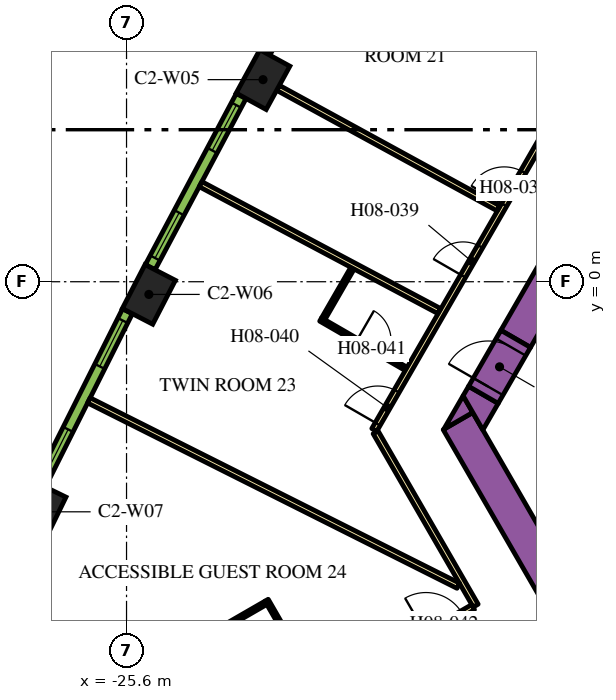
"""IFC4 building model, lengths in metres.
Left out: names, types, materials, properties, quantities, classifications, styles, units other than length and angle.
Written with IfcOpenShell. Run it as: python <this file> out.ifc"""

import sys

from ifc_helpers import new_model, si_unit, direction, frame, frame_2d, origin, origin_2d, place, context, subcontext, project, spatial, polyline, rectangle, outline, extrude, element, fill, save


model = new_model("IFC4")
c1 = context("Model", 3, precision=1e-05, world=origin(), true_north=direction((0.0, 1.0)))
c2 = subcontext(c1, "Body", "Model", "MODEL_VIEW")
j1 = project(units=[si_unit("LENGTHUNIT", "METRE"), si_unit("PLANEANGLEUNIT", "RADIAN")], contexts=[c1])
p1 = place(None, origin())
s1 = spatial("IfcSite", under=j1, at=p1, CompositionType="ELEMENT")
p2 = place(p1, origin())
s2 = spatial("IfcBuilding", under=s1, at=p2, CompositionType="ELEMENT")
p3 = place(p2, frame((0.0, 0.0, 107.1)))
s3 = spatial("IfcBuildingStorey", under=s2, at=p3, CompositionType="ELEMENT", Elevation=107.1)
for number, where, z_axis, x_axis in (
    (1, (-22.009, 5.317, 0.0), (0.0, 0.0, 1.0), (-0.48, -0.877, 0.0)),
    (2, (-25.012, -0.334, 0.0), (0.0, 0.0, 1.0), (-0.459, -0.888, 0.0)),
    (3, (-27.883, -6.054, 0.0), (0.0, 0.0, 1.0), (-0.438, -0.899, 0.0)),
):
    element("IfcColumn", number, at=place(p3, frame(where, z_axis=z_axis, x_axis=x_axis)), inside=s3, PredefinedType="COLUMN", context=c2, shape_type="SweptSolid", body=[
        extrude(rectangle(XDim=1.3, YDim=0.9, at=origin_2d()), origin(), (0.0, 0.0, 1.0), 3.9),
    ])
p4 = place(p3, frame((-15.36, -1.503, 0.0), z_axis=(0.0, 0.0, 1.0), x_axis=(0.50000389221, 0.866023156604, 0.0)))
e4 = element("IfcWall", 4, at=p4, inside=s3, PredefinedType="SOLIDWALL", context=c2, shape_type="SweptSolid", body=[
    extrude(rectangle(XDim=21.0, YDim=0.9, at=frame_2d((10.5, 0.0))), origin(), (0.0, 0.0, 1.0), 3.9),
])
p5 = place(p3, frame((-12.134, -11.883, 0.0), z_axis=(0.0, 0.0, 1.0), x_axis=(-0.500005339912, 0.866022320763, 0.0)))
e5 = element("IfcWall", 5, at=p5, inside=s3, PredefinedType="SOLIDWALL", context=c2, shape_type="SweptSolid", body=[
    extrude(rectangle(XDim=9.488, YDim=0.9, at=frame_2d((4.744, 0.0))), origin(), (0.0, 0.0, 1.0), 3.9),
])
p6 = place(p3, origin())
e6 = element("IfcWall", 6, at=p6, inside=s3, PredefinedType="SOLIDWALL", context=c2, shape_type="SweptSolid", body=[
    extrude(outline(polyline([(-16.489, -3.44), (-17.251, -3.88), (-16.743, -3.0), (-16.489, -3.44)])), origin(), (0.0, 0.0, 1.0), 3.9),
])
e7 = element("IfcWall", 7, at=p6, inside=s3, PredefinedType="SOLIDWALL", context=c2, shape_type="SweptSolid", body=[
    extrude(outline(polyline([(-15.82, -3.201), (-16.223, -3.9), (-16.743, -3.0), (-16.599, -2.751), (-15.82, -3.201)])), origin(), (0.0, 0.0, 1.0), 3.9),
])
p7 = place(p3, frame((-16.209, -2.976, 0.0), z_axis=(0.0, 0.0, 1.0), x_axis=(0.499954529098, 0.86605165483, 0.0)))
e8 = element("IfcWall", 8, at=p7, inside=s3, PredefinedType="SOLIDWALL", context=c2, shape_type="SweptSolid", body=[
    extrude(rectangle(XDim=1.7, YDim=0.9, at=frame_2d((0.85, 0.0))), origin(), (0.0, 0.0, 1.0), 3.9),
])
p8 = place(p7, frame((0.25, 0.0, 0.0)))
e9 = element("IfcOpeningElement", 9, at=p8, cuts=e8, PredefinedType="OPENING", context=c2, shape_type="SweptSolid", body=[
    extrude(rectangle(XDim=1.2, YDim=2.1, at=frame_2d((0.6, 1.05))), frame((0.0, 0.46, 0.0), z_axis=(0.0, -1.0, 0.0), x_axis=(1.0, 0.0, 0.0)), (0.0, 0.0, 1.0), 0.92),
])
p9 = place(p3, frame((-19.081, -3.9, 0.0), z_axis=(0.0, 0.0, 1.0), x_axis=(0.499998313975, 0.866026377209, 0.0)))
e10 = element("IfcWall", 10, at=p9, inside=s3, PredefinedType="PARTITIONING", context=c2, shape_type="SweptSolid", body=[
    extrude(rectangle(XDim=25.766, YDim=0.15, at=frame_2d((12.883, 0.0))), origin(), (0.0, 0.0, 1.0), 2.75),
])
p10 = place(p9, frame((19.306, 0.0, 0.0)))
e11 = element("IfcOpeningElement", 11, at=p10, cuts=e10, PredefinedType="OPENING", context=c2, shape_type="SweptSolid", body=[
    extrude(rectangle(XDim=1.0, YDim=2.1, at=frame_2d((0.5, 1.05))), frame((0.0, 0.085, 0.0), z_axis=(0.0, -1.0, 0.0), x_axis=(1.0, 0.0, 0.0)), (0.0, 0.0, 1.0), 0.17),
])
p11 = place(p9, frame((18.0, 0.0, 0.0)))
e12 = element("IfcOpeningElement", 12, at=p11, cuts=e10, PredefinedType="OPENING", context=c2, shape_type="SweptSolid", body=[
    extrude(rectangle(XDim=1.0, YDim=2.1, at=frame_2d((0.5, 1.05))), frame((0.0, 0.085, 0.0), z_axis=(0.0, -1.0, 0.0), x_axis=(1.0, 0.0, 0.0)), (0.0, 0.0, 1.0), 0.17),
])
p12 = place(p9, frame((6.838, 0.0, 0.0)))
e13 = element("IfcOpeningElement", 13, at=p12, cuts=e10, PredefinedType="OPENING", context=c2, shape_type="SweptSolid", body=[
    extrude(rectangle(XDim=1.0, YDim=2.1, at=frame_2d((0.5, 1.05))), frame((0.0, 0.085, 0.0), z_axis=(0.0, -1.0, 0.0), x_axis=(1.0, 0.0, 0.0)), (0.0, 0.0, 1.0), 0.17),
])
p13 = place(p9, frame((4.674, 0.0, 0.0)))
e14 = element("IfcOpeningElement", 14, at=p13, cuts=e10, PredefinedType="OPENING", context=c2, shape_type="SweptSolid", body=[
    extrude(rectangle(XDim=0.9, YDim=2.1, at=frame_2d((0.45, 1.05))), frame((0.0, 0.085, 0.0), z_axis=(0.0, -1.0, 0.0), x_axis=(1.0, 0.0, 0.0)), (0.0, 0.0, 1.0), 0.17),
])
p14 = place(p9, frame((0.18, 0.0, 0.0)))
e15 = element("IfcOpeningElement", 15, at=p14, cuts=e10, PredefinedType="OPENING", context=c2, shape_type="SweptSolid", body=[
    extrude(rectangle(XDim=1.0, YDim=2.1, at=frame_2d((0.5, 1.05))), frame((0.0, 0.085, 0.0), z_axis=(0.0, -1.0, 0.0), x_axis=(1.0, 0.0, 0.0)), (0.0, 0.0, 1.0), 0.17),
])
p15 = place(p3, frame((-16.412, -8.523, 0.0), z_axis=(0.0, 0.0, 1.0), x_axis=(-0.500001929737, 0.866024289647, 0.0)))
e16 = element("IfcWall", 16, at=p15, inside=s3, PredefinedType="PARTITIONING", context=c2, shape_type="SweptSolid", body=[
    extrude(rectangle(XDim=5.268, YDim=0.15, at=frame_2d((2.634, 0.0))), origin(), (0.0, 0.0, 1.0), 2.75),
])
p16 = place(p3, frame((-28.211, -15.335, 0.0), z_axis=(0.0, 0.0, 1.0), x_axis=(0.866025884867, 0.49999916674, 0.0)))
e17 = element("IfcWall", 17, at=p16, inside=s3, PredefinedType="PARTITIONING", context=c2, shape_type="SweptSolid", body=[
    extrude(rectangle(XDim=13.543, YDim=0.15, at=frame_2d((6.772, 0.0))), origin(), (0.0, 0.0, 1.0), 2.75),
])
p17 = place(p16, frame((12.114, 0.0, 0.0)))
e18 = element("IfcOpeningElement", 18, at=p17, cuts=e17, PredefinedType="OPENING", context=c2, shape_type="SweptSolid", body=[
    extrude(rectangle(XDim=1.1, YDim=2.1, at=frame_2d((0.55, 1.05))), frame((0.0, 0.085, 0.0), z_axis=(0.0, -1.0, 0.0), x_axis=(1.0, 0.0, 0.0)), (0.0, 0.0, 1.0), 0.17),
])
p18 = place(p16, frame((4.65, 0.0, 0.0)))
e19 = element("IfcOpeningElement", 19, at=p18, cuts=e17, PredefinedType="OPENING", context=c2, shape_type="SweptSolid", body=[
    extrude(rectangle(XDim=1.0, YDim=2.1, at=frame_2d((0.5, 1.05))), frame((0.0, 0.085, 0.0), z_axis=(0.0, -1.0, 0.0), x_axis=(1.0, 0.0, 0.0)), (0.0, 0.0, 1.0), 0.17),
])
p19 = place(p3, frame((-29.406, -8.901, 0.0), z_axis=(0.0, 0.0, 1.0), x_axis=(0.904002363742, -0.427527456836, 0.0)))
e20 = element("IfcWall", 20, at=p19, inside=s3, PredefinedType="PARTITIONING", context=c2, shape_type="SweptSolid", body=[
    extrude(rectangle(XDim=7.362, YDim=0.15, at=frame_2d((3.681, 0.0))), origin(), (0.0, 0.0, 1.0), 2.75),
])
p20 = place(p3, frame((-23.652, 2.567, 0.0), z_axis=(0.0, 0.0, 1.0), x_axis=(0.883019237957, -0.469336793144, 0.0)))
e21 = element("IfcWall", 21, at=p20, inside=s3, PredefinedType="PARTITIONING", context=c2, shape_type="SweptSolid", body=[
    extrude(rectangle(XDim=7.111, YDim=0.15, at=frame_2d((3.555, 0.0))), origin(), (0.0, 0.0, 1.0), 2.75),
])
p21 = place(p3, frame((-26.591, -3.122, 0.0), z_axis=(0.0, 0.0, 1.0), x_axis=(0.893766213273, -0.448533115847, 0.0)))
e22 = element("IfcWall", 22, at=p21, inside=s3, PredefinedType="PARTITIONING", context=c2, shape_type="SweptSolid", body=[
    extrude(rectangle(XDim=10.875, YDim=0.15, at=frame_2d((5.438, 0.0))), origin(), (0.0, 0.0, 1.0), 2.75),
])
p22 = place(p3, frame((-21.614, 5.102, 0.0), z_axis=(0.0, 0.0, 1.0), x_axis=(0.877484555087, -0.479604895287, 0.0)))
e23 = element("IfcWall", 23, at=p22, inside=s3, PredefinedType="PARTITIONING", context=c2, shape_type="SweptSolid", body=[
    extrude(rectangle(XDim=6.611, YDim=0.15, at=frame_2d((3.306, 0.0))), origin(), (0.0, 0.0, 1.0), 2.75),
])
p23 = place(p3, frame((-15.852, 7.044, 0.0), z_axis=(0.0, 0.0, 1.0), x_axis=(0.866021400173, -0.500006934395, 0.0)))
e24 = element("IfcWall", 24, at=p23, inside=s3, PredefinedType="PARTITIONING", context=c2, shape_type="SweptSolid", body=[
    extrude(rectangle(XDim=2.6, YDim=0.1, at=frame_2d((1.3, 0.0))), origin(), (0.0, 0.0, 1.0), 2.75),
])
p24 = place(p23, frame((1.1, 0.0, 0.0)))
e25 = element("IfcOpeningElement", 25, at=p24, cuts=e24, PredefinedType="OPENING", context=c2, shape_type="SweptSolid", body=[
    extrude(rectangle(XDim=0.9, YDim=2.1, at=frame_2d((0.45, 1.05))), frame((0.0, 0.06, 0.0), z_axis=(0.0, -1.0, 0.0), x_axis=(1.0, 0.0, 0.0)), (0.0, 0.0, 1.0), 0.12),
])
p25 = place(p3, frame((-20.492, -0.994, 0.0), z_axis=(0.0, 0.0, 1.0), x_axis=(0.865997922154, -0.500047596559, 0.0)))
e26 = element("IfcWall", 26, at=p25, inside=s3, PredefinedType="PARTITIONING", context=c2, shape_type="SweptSolid", body=[
    extrude(rectangle(XDim=2.6, YDim=0.1, at=frame_2d((1.3, 0.0))), origin(), (0.0, 0.0, 1.0), 2.75),
])
p26 = place(p25, frame((1.1, 0.0, 0.0)))
e27 = element("IfcOpeningElement", 27, at=p26, cuts=e26, PredefinedType="OPENING", context=c2, shape_type="SweptSolid", body=[
    extrude(rectangle(XDim=0.9, YDim=2.1, at=frame_2d((0.45, 1.05))), frame((0.0, 0.06, 0.0), z_axis=(0.0, -1.0, 0.0), x_axis=(1.0, 0.0, 0.0)), (0.0, 0.0, 1.0), 0.12),
])
p27 = place(p3, frame((-20.424, -0.976, 0.0), z_axis=(0.0, 0.0, 1.0), x_axis=(0.500086174919, 0.865975644955, 0.0)))
e28 = element("IfcWall", 28, at=p27, inside=s3, PredefinedType="PARTITIONING", context=c2, shape_type="SweptSolid", body=[
    extrude(rectangle(XDim=1.53, YDim=0.1, at=frame_2d((0.765, 0.0))), origin(), (0.0, 0.0, 1.0), 2.75),
])
p28 = place(p3, frame((-20.515, -10.805, 0.0), z_axis=(0.0, 0.0, 1.0), x_axis=(-0.49994636267, 0.866056369097, 0.0)))
e29 = element("IfcWall", 29, at=p28, inside=s3, PredefinedType="PARTITIONING", context=c2, shape_type="SweptSolid", body=[
    extrude(rectangle(XDim=2.8, YDim=0.1, at=frame_2d((1.4, 0.0))), origin(), (0.0, 0.0, 1.0), 2.75),
])
p29 = place(p28, frame((0.55, 0.0, 0.0)))
e30 = element("IfcOpeningElement", 30, at=p29, cuts=e29, PredefinedType="OPENING", context=c2, shape_type="SweptSolid", body=[
    extrude(rectangle(XDim=1.0, YDim=2.1, at=frame_2d((0.5, 1.05))), frame((0.0, 0.06, 0.0), z_axis=(0.0, -1.0, 0.0), x_axis=(1.0, 0.0, 0.0)), (0.0, 0.0, 1.0), 0.12),
])
p30 = place(p3, frame((-21.933, -8.448, 0.0), z_axis=(0.0, 0.0, 1.0), x_axis=(-0.866022959057, -0.500004234368, 0.0)))
e31 = element("IfcWall", 31, at=p30, inside=s3, PredefinedType="PARTITIONING", context=c2, shape_type="SweptSolid", body=[
    extrude(rectangle(XDim=2.5, YDim=0.1, at=frame_2d((1.25, 0.0))), origin(), (0.0, 0.0, 1.0), 2.75),
])
p31 = place(p3, frame((-19.458, 10.48, 0.0), z_axis=(0.0, 0.0, 1.0), x_axis=(-0.48983164787, -0.87181704316, 0.0)))
e32 = element("IfcWall", 32, at=p31, inside=s3, PredefinedType="SOLIDWALL", context=c2, shape_type="SweptSolid", body=[
    extrude(rectangle(XDim=5.1, YDim=0.29, at=frame_2d((2.55, 0.0))), origin(), (0.0, 0.0, 1.0), 3.65),
])
p32 = place(p31, frame((0.272, 0.0, 0.9)))
e33 = element("IfcOpeningElement", 33, at=p32, cuts=e32, PredefinedType="OPENING", context=c2, shape_type="SweptSolid", body=[
    extrude(rectangle(XDim=1.35, YDim=2.15, at=frame_2d((0.675, 1.075))), frame((0.0, 0.155, 0.0), z_axis=(0.0, -1.0, 0.0), x_axis=(1.0, 0.0, 0.0)), (0.0, 0.0, 1.0), 0.31),
])
p33 = place(p31, frame((3.478, 0.0, 0.9)))
e34 = element("IfcOpeningElement", 34, at=p33, cuts=e32, PredefinedType="OPENING", context=c2, shape_type="SweptSolid", body=[
    extrude(rectangle(XDim=1.35, YDim=2.15, at=frame_2d((0.675, 1.075))), frame((0.0, 0.155, 0.0), z_axis=(0.0, -1.0, 0.0), x_axis=(1.0, 0.0, 0.0)), (0.0, 0.0, 1.0), 0.31),
])
p34 = place(p3, frame((-22.583, 4.887, 0.0), z_axis=(0.0, 0.0, 1.0), x_axis=(-0.469323203119, -0.883026461106, 0.0)))
e35 = element("IfcWall", 35, at=p34, inside=s3, PredefinedType="SOLIDWALL", context=c2, shape_type="SweptSolid", body=[
    extrude(rectangle(XDim=5.101, YDim=0.29, at=frame_2d((2.55, 0.0))), origin(), (0.0, 0.0, 1.0), 3.65),
])
p35 = place(p34, frame((0.273, 0.0, 0.9)))
e36 = element("IfcOpeningElement", 36, at=p35, cuts=e35, PredefinedType="OPENING", context=c2, shape_type="SweptSolid", body=[
    extrude(rectangle(XDim=1.35, YDim=2.15, at=frame_2d((0.675, 1.075))), frame((0.0, 0.155, 0.0), z_axis=(0.0, -1.0, 0.0), x_axis=(1.0, 0.0, 0.0)), (0.0, 0.0, 1.0), 0.31),
])
p36 = place(p34, frame((3.478, 0.0, 0.9)))
e37 = element("IfcOpeningElement", 37, at=p36, cuts=e35, PredefinedType="OPENING", context=c2, shape_type="SweptSolid", body=[
    extrude(rectangle(XDim=1.35, YDim=2.15, at=frame_2d((0.675, 1.075))), frame((0.0, 0.155, 0.0), z_axis=(0.0, -1.0, 0.0), x_axis=(1.0, 0.0, 0.0)), (0.0, 0.0, 1.0), 0.31),
])
p37 = place(p3, frame((-25.576, -0.778, 0.0), z_axis=(0.0, 0.0, 1.0), x_axis=(-0.448534297211, -0.893765620409, 0.0)))
e38 = element("IfcWall", 38, at=p37, inside=s3, PredefinedType="SOLIDWALL", context=c2, shape_type="SweptSolid", body=[
    extrude(rectangle(XDim=5.1, YDim=0.29, at=frame_2d((2.55, 0.0))), origin(), (0.0, 0.0, 1.0), 3.65),
])
p38 = place(p37, frame((0.272, 0.0, 0.9)))
e39 = element("IfcOpeningElement", 39, at=p38, cuts=e38, PredefinedType="OPENING", context=c2, shape_type="SweptSolid", body=[
    extrude(rectangle(XDim=1.35, YDim=2.15, at=frame_2d((0.675, 1.075))), frame((0.0, 0.155, 0.0), z_axis=(0.0, -1.0, 0.0), x_axis=(1.0, 0.0, 0.0)), (0.0, 0.0, 1.0), 0.31),
])
p39 = place(p37, frame((3.478, 0.0, 0.9)))
e40 = element("IfcOpeningElement", 40, at=p39, cuts=e38, PredefinedType="OPENING", context=c2, shape_type="SweptSolid", body=[
    extrude(rectangle(XDim=1.35, YDim=2.15, at=frame_2d((0.675, 1.075))), frame((0.0, 0.155, 0.0), z_axis=(0.0, -1.0, 0.0), x_axis=(1.0, 0.0, 0.0)), (0.0, 0.0, 1.0), 0.31),
])
p40 = place(p8, origin())
e41 = element("IfcDoor", 41, at=p40, inside=s3, OperationType="SINGLE_SWING_LEFT", PredefinedType="DOOR", context=c2, shape_type="SweptSolid", body=[
    extrude(rectangle(XDim=1.2, YDim=2.1, at=frame_2d((0.6, 1.05))), frame((0.0, 0.025, 0.0), z_axis=(0.0, -1.0, 0.0), x_axis=(1.0, 0.0, 0.0)), (0.0, 0.0, 1.0), 0.05),
])
fill(e9, e41)
p41 = place(p12, origin())
e42 = element("IfcDoor", 42, at=p41, inside=s3, OperationType="SINGLE_SWING_LEFT", PredefinedType="DOOR", context=c2, shape_type="SweptSolid", body=[
    extrude(rectangle(XDim=1.0, YDim=2.1, at=frame_2d((0.5, 1.05))), frame((0.0, 0.025, 0.0), z_axis=(0.0, -1.0, 0.0), x_axis=(1.0, 0.0, 0.0)), (0.0, 0.0, 1.0), 0.05),
])
fill(e13, e42)
p42 = place(p24, origin())
e43 = element("IfcDoor", 43, at=p42, inside=s3, OperationType="SINGLE_SWING_RIGHT", PredefinedType="DOOR", context=c2, shape_type="SweptSolid", body=[
    extrude(rectangle(XDim=0.9, YDim=2.1, at=frame_2d((0.45, 1.05))), frame((0.0, 0.025, 0.0), z_axis=(0.0, -1.0, 0.0), x_axis=(1.0, 0.0, 0.0)), (0.0, 0.0, 1.0), 0.05),
])
fill(e25, e43)
p43 = place(p13, origin())
e44 = element("IfcDoor", 44, at=p43, inside=s3, OperationType="SINGLE_SWING_RIGHT", PredefinedType="DOOR", context=c2, shape_type="SweptSolid", body=[
    extrude(rectangle(XDim=0.9, YDim=2.1, at=frame_2d((0.45, 1.05))), frame((0.0, 0.025, 0.0), z_axis=(0.0, -1.0, 0.0), x_axis=(1.0, 0.0, 0.0)), (0.0, 0.0, 1.0), 0.05),
])
fill(e14, e44)
p44 = place(p14, origin())
e45 = element("IfcDoor", 45, at=p44, inside=s3, OperationType="SINGLE_SWING_LEFT", PredefinedType="DOOR", context=c2, shape_type="SweptSolid", body=[
    extrude(rectangle(XDim=1.0, YDim=2.1, at=frame_2d((0.5, 1.05))), frame((0.0, 0.025, 0.0), z_axis=(0.0, -1.0, 0.0), x_axis=(1.0, 0.0, 0.0)), (0.0, 0.0, 1.0), 0.05),
])
fill(e15, e45)
p45 = place(p26, origin())
e46 = element("IfcDoor", 46, at=p45, inside=s3, OperationType="SINGLE_SWING_LEFT", PredefinedType="DOOR", context=c2, shape_type="SweptSolid", body=[
    extrude(rectangle(XDim=0.9, YDim=2.1, at=frame_2d((0.45, 1.05))), frame((0.0, 0.025, 0.0), z_axis=(0.0, -1.0, 0.0), x_axis=(1.0, 0.0, 0.0)), (0.0, 0.0, 1.0), 0.05),
])
fill(e27, e46)
p46 = place(p17, origin())
e47 = element("IfcDoor", 47, at=p46, inside=s3, OperationType="SINGLE_SWING_RIGHT", PredefinedType="DOOR", context=c2, shape_type="SweptSolid", body=[
    extrude(rectangle(XDim=1.1, YDim=2.1, at=frame_2d((0.55, 1.05))), frame((0.0, 0.025, 0.0), z_axis=(0.0, -1.0, 0.0), x_axis=(1.0, 0.0, 0.0)), (0.0, 0.0, 1.0), 0.05),
])
fill(e18, e47)
p47 = place(p35, origin())
e48 = element("IfcWindow", 48, at=p47, inside=s3, PartitioningType="DOUBLE_PANEL_VERTICAL", PredefinedType="WINDOW", context=c2, shape_type="SweptSolid", body=[
    extrude(rectangle(XDim=1.35, YDim=2.15, at=frame_2d((0.675, 1.075))), frame((0.0, 0.015, 0.0), z_axis=(0.0, -1.0, 0.0), x_axis=(1.0, 0.0, 0.0)), (0.0, 0.0, 1.0), 0.06),
])
fill(e36, e48)
p48 = place(p36, origin())
e49 = element("IfcWindow", 49, at=p48, inside=s3, PartitioningType="DOUBLE_PANEL_VERTICAL", PredefinedType="WINDOW", context=c2, shape_type="SweptSolid", body=[
    extrude(rectangle(XDim=1.35, YDim=2.15, at=frame_2d((0.675, 1.075))), frame((0.0, 0.015, 0.0), z_axis=(0.0, -1.0, 0.0), x_axis=(1.0, 0.0, 0.0)), (0.0, 0.0, 1.0), 0.06),
])
fill(e37, e49)
p49 = place(p38, origin())
e50 = element("IfcWindow", 50, at=p49, inside=s3, PartitioningType="DOUBLE_PANEL_VERTICAL", PredefinedType="WINDOW", context=c2, shape_type="SweptSolid", body=[
    extrude(rectangle(XDim=1.35, YDim=2.15, at=frame_2d((0.675, 1.075))), frame((0.0, 0.015, 0.0), z_axis=(0.0, -1.0, 0.0), x_axis=(1.0, 0.0, 0.0)), (0.0, 0.0, 1.0), 0.06),
])
fill(e39, e50)
p50 = place(p39, origin())
e51 = element("IfcWindow", 51, at=p50, inside=s3, PartitioningType="DOUBLE_PANEL_VERTICAL", PredefinedType="WINDOW", context=c2, shape_type="SweptSolid", body=[
    extrude(rectangle(XDim=1.35, YDim=2.15, at=frame_2d((0.675, 1.075))), frame((0.0, 0.015, 0.0), z_axis=(0.0, -1.0, 0.0), x_axis=(1.0, 0.0, 0.0)), (0.0, 0.0, 1.0), 0.06),
])
fill(e40, e51)
save(model, sys.argv[1])
